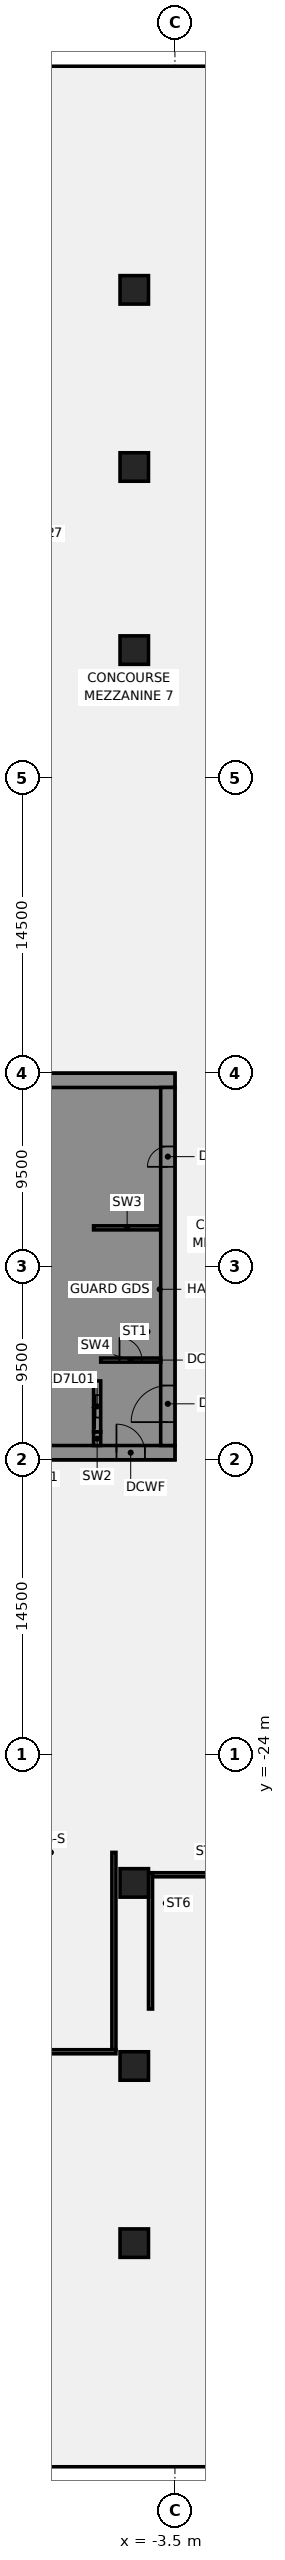
"""IFC4 building model, lengths in metres.
Left out: names, types, materials, properties, quantities, classifications, styles, units other than length and angle.
Written with IfcOpenShell. Run it as: python <this file> out.ifc"""

import sys

from ifc_helpers import new_model, si_unit, direction, frame, frame_2d, origin, origin_2d, place, context, subcontext, project, spatial, polyline, rectangle, outline, extrude, element, fill, save


model = new_model("IFC4")
c1 = context("Model", 3, precision=1e-05, world=origin(), true_north=direction((0.0, 1.0)))
c2 = subcontext(c1, "Body", "Model", "MODEL_VIEW")
j1 = project(units=[si_unit("LENGTHUNIT", "METRE"), si_unit("PLANEANGLEUNIT", "RADIAN")], contexts=[c1])
p1 = place(None, origin())
s1 = spatial("IfcSite", under=j1, at=p1, CompositionType="ELEMENT")
p2 = place(p1, origin())
s2 = spatial("IfcBuilding", under=s1, at=p2, CompositionType="ELEMENT")
p3 = place(p2, frame((0.0, 0.0, 9.0)))
s3 = spatial("IfcBuildingStorey", under=s2, at=p3, CompositionType="ELEMENT", Elevation=9.0)
for number, where, z_axis, x_axis in (
    (1, (-5.5, 39.3, -0.5), (0.0, 0.0, 1.0), (1.0, 0.0, 0.0)),
    (2, (-5.5, 30.3, -0.5), (0.0, 0.0, 1.0), (1.0, 0.0, 0.0)),
    (3, (-5.5, 48.008, -0.5), (0.0, 0.0, 1.0), (1.0, 0.0, 0.0)),
    (4, (-5.5, -39.3, -0.5), (0.0, 0.0, 1.0), (1.0, 0.0, 0.0)),
    (5, (-5.5, -30.3, -0.5), (0.0, 0.0, 1.0), (1.0, 0.0, 0.0)),
    (6, (-5.5, -48.008, -0.5), (0.0, 0.0, 1.0), (1.0, 0.0, 0.0)),
):
    element("IfcColumn", number, at=place(p3, frame(where, z_axis=z_axis, x_axis=x_axis)), inside=s3, PredefinedType="COLUMN", context=c2, shape_type="SweptSolid", body=[
        extrude(rectangle(XDim=1.4, YDim=1.4, at=origin_2d()), origin(), (0.0, 0.0, 1.0), 6.0),
    ])
p4 = place(p3, frame((-6.5, -28.8, 0.0), z_axis=(0.0, 0.0, 1.0), x_axis=(0.0, -1.0, 0.0)))
e7 = element("IfcWall", 7, at=p4, inside=s3, PredefinedType="SOLIDWALL", context=c2, shape_type="SweptSolid", body=[
    extrude(rectangle(XDim=9.7, YDim=0.2, at=frame_2d((4.85, 0.0))), origin(), (0.0, 0.0, 1.0), 5.5),
])
p5 = place(p3, frame((-10.7, -38.6, 0.0), z_axis=(0.0, 0.0, 1.0), x_axis=(1.0, 0.0, 0.0)))
e8 = element("IfcWall", 8, at=p5, inside=s3, PredefinedType="SOLIDWALL", context=c2, shape_type="SweptSolid", body=[
    extrude(rectangle(XDim=4.3, YDim=0.2, at=frame_2d((2.15, 0.0))), origin(), (0.0, 0.0, 1.0), 5.5),
])
p6 = place(p3, frame((-16.5, -9.15, 0.0), z_axis=(0.0, 0.0, 1.0), x_axis=(1.0, 0.0, 0.0)))
e9 = element("IfcWall", 9, at=p6, inside=s3, PredefinedType="SHEAR", context=c2, shape_type="SweptSolid", body=[
    extrude(rectangle(XDim=13.0, YDim=0.7, at=frame_2d((6.5, 0.0))), origin(), (0.0, 0.0, 1.0), 5.5),
])
p7 = place(p6, frame((4.15, 0.0, 0.0)))
e10 = element("IfcOpeningElement", 10, at=p7, cuts=e9, PredefinedType="OPENING", context=c2, shape_type="SweptSolid", body=[
    extrude(rectangle(XDim=1.4, YDim=2.1, at=frame_2d((0.7, 1.05))), frame((0.0, 0.36, 0.0), z_axis=(0.0, -1.0, 0.0), x_axis=(1.0, 0.0, 0.0)), (0.0, 0.0, 1.0), 0.72),
])
p8 = place(p6, frame((10.125, 0.0, 0.0)))
e11 = element("IfcOpeningElement", 11, at=p8, cuts=e9, PredefinedType="OPENING", context=c2, shape_type="SweptSolid", body=[
    extrude(rectangle(XDim=1.4, YDim=2.1, at=frame_2d((0.7, 1.05))), frame((0.0, 0.36, 0.0), z_axis=(0.0, -1.0, 0.0), x_axis=(1.0, 0.0, 0.0)), (0.0, 0.0, 1.0), 0.72),
])
p9 = place(p3, frame((-16.5, 9.15, 0.0), z_axis=(0.0, 0.0, 1.0), x_axis=(1.0, 0.0, 0.0)))
e12 = element("IfcWall", 12, at=p9, inside=s3, PredefinedType="SHEAR", context=c2, shape_type="SweptSolid", body=[
    extrude(rectangle(XDim=13.0, YDim=0.7, at=frame_2d((6.5, 0.0))), origin(), (0.0, 0.0, 1.0), 5.5),
])
p10 = place(p3, origin())
e13 = element("IfcWall", 13, at=p10, inside=s3, PredefinedType="SHEAR", context=c2, shape_type="SweptSolid", body=[
    extrude(outline(polyline([(-9.8, -5.375), (-9.8, -5.625), (-7.5, -5.625), (-7.15, -5.625), (-7.15, 8.8), (-7.5, 8.8), (-9.8, 8.8), (-9.8, 8.125), (-7.5, 8.125), (-7.5, 5.625), (-9.8, 5.625), (-9.8, 5.375), (-7.5, 5.375), (-7.5, 2.875), (-9.8, 2.875), (-9.8, 2.625), (-7.5, 2.625), (-7.5, 0.125), (-9.8, 0.125), (-9.8, -0.125), (-7.5, -0.125), (-7.5, -2.625), (-9.8, -2.625), (-9.8, -2.875), (-7.5, -2.875), (-7.5, -5.375), (-9.8, -5.375)])), origin(), (0.0, 0.0, 1.0), 5.5),
])
p11 = place(p3, origin())
e14 = element("IfcWall", 14, at=p11, inside=s3, PredefinedType="SHEAR", context=c2, shape_type="SweptSolid", body=[
    extrude(outline(polyline([(-7.5, -8.125), (-9.55, -8.125), (-9.55, -5.625), (-9.8, -5.625), (-9.8, -8.125), (-9.8, -8.8), (-7.5, -8.8), (-7.5, -8.125)])), origin(), (0.0, 0.0, 1.0), 5.5),
])
p12 = place(p3, frame((-7.325, -8.8, 0.0), z_axis=(0.0, 0.0, 1.0), x_axis=(0.0, 1.0, 0.0)))
e15 = element("IfcWall", 15, at=p12, inside=s3, PredefinedType="SHEAR", context=c2, shape_type="SweptSolid", body=[
    extrude(rectangle(XDim=0.675, YDim=0.35, at=frame_2d((0.337, 0.0))), origin(), (0.0, 0.0, 1.0), 5.5),
])
p13 = place(p3, frame((-7.5, 1.9, 0.0), z_axis=(0.0, 0.0, 1.0), x_axis=(1.0, 0.0, 0.0)))
e16 = element("IfcWall", 16, at=p13, inside=s3, PredefinedType="SHEAR", context=c2, shape_type="SweptSolid", body=[
    extrude(rectangle(XDim=3.3, YDim=0.2, at=frame_2d((1.65, 0.0))), origin(), (0.0, 0.0, 1.0), 5.5),
])
p14 = place(p3, frame((-7.325, -8.125, 0.0), z_axis=(0.0, 0.0, 1.0), x_axis=(0.0, 1.0, 0.0)))
e17 = element("IfcWall", 17, at=p14, inside=s3, PredefinedType="SHEAR", context=c2, shape_type="SweptSolid", body=[
    extrude(rectangle(XDim=2.5, YDim=0.35, at=frame_2d((1.25, 0.0))), origin(), (0.0, 0.0, 1.0), 5.5),
])
p15 = place(p14, frame((0.7, 0.0, 0.0)))
e18 = element("IfcOpeningElement", 18, at=p15, cuts=e17, PredefinedType="OPENING", context=c2, shape_type="SweptSolid", body=[
    extrude(rectangle(XDim=1.1, YDim=2.1, at=frame_2d((0.55, 1.05))), frame((0.0, 0.185, 0.0), z_axis=(0.0, -1.0, 0.0), x_axis=(1.0, 0.0, 0.0)), (0.0, 0.0, 1.0), 0.37),
])
p16 = place(p3, frame((-3.85, -8.8, 0.0), z_axis=(0.0, 0.0, 1.0), x_axis=(0.0, 1.0, 0.0)))
e19 = element("IfcWall", 19, at=p16, inside=s3, PredefinedType="SHEAR", context=c2, shape_type="SweptSolid", body=[
    extrude(rectangle(XDim=17.6, YDim=0.7, at=frame_2d((8.8, 0.0))), origin(), (0.0, 0.0, 1.0), 5.5),
])
p17 = place(p16, frame((1.15, 0.0, 0.0)))
e20 = element("IfcOpeningElement", 20, at=p17, cuts=e19, PredefinedType="OPENING", context=c2, shape_type="SweptSolid", body=[
    extrude(rectangle(XDim=1.8, YDim=2.1, at=frame_2d((0.9, 1.05))), frame((0.0, 0.36, 0.0), z_axis=(0.0, -1.0, 0.0), x_axis=(1.0, 0.0, 0.0)), (0.0, 0.0, 1.0), 0.72),
])
p18 = place(p16, frame((13.7, 0.0, 0.0)))
e21 = element("IfcOpeningElement", 21, at=p18, cuts=e19, PredefinedType="OPENING", context=c2, shape_type="SweptSolid", body=[
    extrude(rectangle(XDim=1.0, YDim=2.1, at=frame_2d((0.5, 1.05))), frame((0.0, 0.36, 0.0), z_axis=(0.0, -1.0, 0.0), x_axis=(1.0, 0.0, 0.0)), (0.0, 0.0, 1.0), 0.72),
])
p19 = place(p3, frame((-7.15, -4.6, 0.0), z_axis=(0.0, 0.0, 1.0), x_axis=(1.0, 0.0, 0.0)))
e22 = element("IfcWall", 22, at=p19, inside=s3, PredefinedType="SHEAR", context=c2, shape_type="SweptSolid", body=[
    extrude(rectangle(XDim=2.95, YDim=0.2, at=frame_2d((1.475, 0.0))), origin(), (0.0, 0.0, 1.0), 5.5),
])
p20 = place(p19, frame((0.925, 0.0, 0.0)))
e23 = element("IfcOpeningElement", 23, at=p20, cuts=e22, PredefinedType="OPENING", context=c2, shape_type="SweptSolid", body=[
    extrude(rectangle(XDim=1.1, YDim=2.1, at=frame_2d((0.55, 1.05))), frame((0.0, 0.11, 0.0), z_axis=(0.0, -1.0, 0.0), x_axis=(1.0, 0.0, 0.0)), (0.0, 0.0, 1.0), 0.22),
])
p21 = place(p3, frame((-4.7, -29.8, 0.0), z_axis=(0.0, 0.0, 1.0), x_axis=(0.0, -1.0, 0.0)))
e24 = element("IfcWall", 24, at=p21, inside=s3, PredefinedType="SHEAR", context=c2, shape_type="SweptSolid", body=[
    extrude(rectangle(XDim=6.7, YDim=0.2, at=frame_2d((3.35, 0.0))), origin(), (0.0, 0.0, 1.0), 5.5),
])
p22 = place(p3, frame((-4.6, -29.9, 0.0), z_axis=(0.0, 0.0, 1.0), x_axis=(1.0, 0.0, 0.0)))
e25 = element("IfcWall", 25, at=p22, inside=s3, PredefinedType="SHEAR", context=c2, shape_type="SweptSolid", body=[
    extrude(rectangle(XDim=3.2, YDim=0.2, at=frame_2d((1.6, 0.0))), origin(), (0.0, 0.0, 1.0), 5.5),
])
p23 = place(p3, origin())
e26 = element("IfcWall", 26, at=p23, inside=s3, PredefinedType="SHEAR", context=c2, shape_type="SweptSolid", body=[
    extrude(outline(polyline([(-4.6, -36.3), (-4.6, -36.5), (-1.4, -36.5), (-1.4, -36.3), (-4.6, -36.3)])), origin(), (0.0, 0.0, 1.0), 5.5),
])
p24 = place(p8, origin())
e27 = element("IfcDoor", 27, at=p24, inside=s3, OperationType="SINGLE_SWING_LEFT", PredefinedType="DOOR", context=c2, shape_type="SweptSolid", body=[
    extrude(rectangle(XDim=1.4, YDim=2.1, at=frame_2d((0.7, 1.05))), frame((0.0, 0.025, 0.0), z_axis=(0.0, -1.0, 0.0), x_axis=(1.0, 0.0, 0.0)), (0.0, 0.0, 1.0), 0.05),
])
fill(e11, e27)
p25 = place(p17, origin())
e28 = element("IfcDoor", 28, at=p25, inside=s3, OperationType="SINGLE_SWING_LEFT", PredefinedType="DOOR", context=c2, shape_type="SweptSolid", body=[
    extrude(rectangle(XDim=1.8, YDim=2.1, at=frame_2d((0.9, 1.05))), frame((0.0, 0.025, 0.0), z_axis=(0.0, -1.0, 0.0), x_axis=(1.0, 0.0, 0.0)), (0.0, 0.0, 1.0), 0.05),
])
fill(e20, e28)
p26 = place(p18, origin())
e29 = element("IfcDoor", 29, at=p26, inside=s3, OperationType="SINGLE_SWING_LEFT", PredefinedType="DOOR", context=c2, shape_type="SweptSolid", body=[
    extrude(rectangle(XDim=1.0, YDim=2.1, at=frame_2d((0.5, 1.05))), frame((0.0, 0.025, 0.0), z_axis=(0.0, -1.0, 0.0), x_axis=(1.0, 0.0, 0.0)), (0.0, 0.0, 1.0), 0.05),
])
fill(e21, e29)
p27 = place(p20, origin())
e30 = element("IfcDoor", 30, at=p27, inside=s3, OperationType="SINGLE_SWING_LEFT", PredefinedType="DOOR", context=c2, shape_type="SweptSolid", body=[
    extrude(rectangle(XDim=1.1, YDim=2.1, at=frame_2d((0.55, 1.05))), frame((0.0, 0.025, 0.0), z_axis=(0.0, -1.0, 0.0), x_axis=(1.0, 0.0, 0.0)), (0.0, 0.0, 1.0), 0.05),
])
fill(e23, e30)
p28 = place(p15, origin())
e31 = element("IfcDoor", 31, at=p28, inside=s3, OperationType="SLIDING_TO_LEFT", PredefinedType="DOOR", context=c2, shape_type="SweptSolid", body=[
    extrude(rectangle(XDim=1.1, YDim=2.1, at=frame_2d((0.55, 1.05))), frame((0.0, 0.025, 0.0), z_axis=(0.0, -1.0, 0.0), x_axis=(1.0, 0.0, 0.0)), (0.0, 0.0, 1.0), 0.05),
])
fill(e18, e31)
save(model, sys.argv[1])
